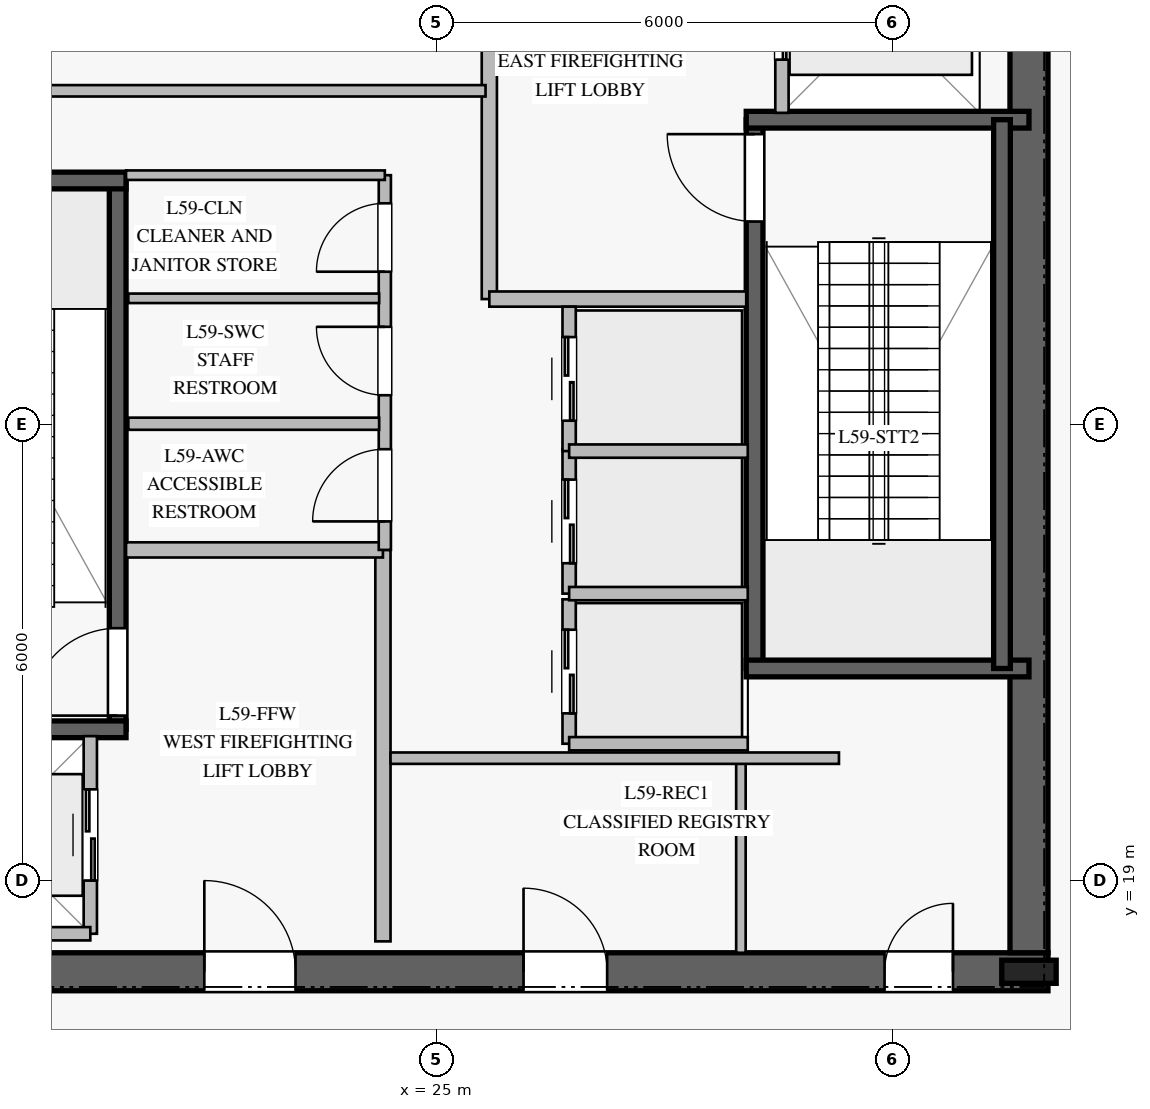
"""IFC4 building model, lengths in metres.
Left out: names, types, materials, properties, quantities, classifications, styles, units other than length and angle.
Written with IfcOpenShell. Run it as: python <this file> out.ifc"""

import sys

from ifc_helpers import new_model, si_unit, direction, frame, frame_2d, origin, origin_2d, place, context, subcontext, project, spatial, rectangle, i_section, extrude, element, fill, save


model = new_model("IFC4")
c1 = context("Model", 3, precision=1e-05, world=origin(), true_north=direction((0.0, 1.0)))
c2 = subcontext(c1, "Body", "Model", "MODEL_VIEW")
j1 = project(units=[si_unit("LENGTHUNIT", "METRE"), si_unit("PLANEANGLEUNIT", "RADIAN")], contexts=[c1])
p1 = place(None, origin())
s1 = spatial("IfcSite", under=j1, at=p1, CompositionType="ELEMENT")
p2 = place(p1, origin())
s2 = spatial("IfcBuilding", under=s1, at=p2, CompositionType="ELEMENT")
p3 = place(p2, frame((0.0, 0.0, 244.8)))
s3 = spatial("IfcBuildingStorey", under=s2, at=p3, CompositionType="ELEMENT", Elevation=244.8)
p4 = place(p3, frame((16.95, 17.8, 0.0), z_axis=(0.0, 0.0, 1.0), x_axis=(1.0, 0.0, 0.0)))
e1 = element("IfcWall", 1, at=p4, inside=s3, PredefinedType="SHEAR", context=c2, shape_type="SweptSolid", body=[
    extrude(rectangle(XDim=16.1, YDim=0.5, at=frame_2d((8.05, 0.0))), origin(), (0.0, 0.0, 1.0), 5.18),
])
p5 = place(p4, frame((5.0, 0.0, 0.0)))
e2 = element("IfcOpeningElement", 2, at=p5, cuts=e1, PredefinedType="OPENING", context=c2, shape_type="SweptSolid", body=[
    extrude(rectangle(XDim=1.2, YDim=2.25, at=frame_2d((0.6, 1.125))), frame((0.0, 0.26, 0.0), z_axis=(0.0, -1.0, 0.0), x_axis=(1.0, 0.0, 0.0)), (0.0, 0.0, 1.0), 0.52),
])
p6 = place(p4, frame((13.95, 0.0, 0.0)))
e3 = element("IfcOpeningElement", 3, at=p6, cuts=e1, PredefinedType="OPENING", context=c2, shape_type="SweptSolid", body=[
    extrude(rectangle(XDim=0.9, YDim=2.1, at=frame_2d((0.45, 1.05))), frame((0.0, 0.26, 0.0), z_axis=(0.0, -1.0, 0.0), x_axis=(1.0, 0.0, 0.0)), (0.0, 0.0, 1.0), 0.52),
])
p7 = place(p4, frame((9.2, 0.0, 0.0)))
e4 = element("IfcOpeningElement", 4, at=p7, cuts=e1, PredefinedType="OPENING", context=c2, shape_type="SweptSolid", body=[
    extrude(rectangle(XDim=1.1, YDim=2.2, at=frame_2d((0.55, 1.1))), frame((0.0, 0.26, 0.0), z_axis=(0.0, -1.0, 0.0), x_axis=(1.0, 0.0, 0.0)), (0.0, 0.0, 1.0), 0.52),
])
p8 = place(p3, frame((32.8, 18.05, 0.0), z_axis=(0.0, 0.0, 1.0), x_axis=(0.0, 1.0, 0.0)))
e5 = element("IfcWall", 5, at=p8, inside=s3, PredefinedType="SHEAR", context=c2, shape_type="SweptSolid", body=[
    extrude(rectangle(XDim=13.9, YDim=0.5, at=frame_2d((6.95, 0.0))), origin(), (0.0, 0.0, 1.0), 5.18),
])
p9 = place(p3, frame((32.8, 17.8, 0.0), z_axis=(0.0, 0.0, 1.0), x_axis=(1.0, 0.0, 0.0)))
e6 = element("IfcColumn", 6, at=p9, inside=s3, PredefinedType="COLUMN", context=c2, shape_type="SweptSolid", body=[
    extrude(i_section(OverallWidth=0.304, OverallDepth=0.716, WebThickness=0.021, FlangeThickness=0.04, at=origin_2d()), origin(), (0.0, 0.0, 1.0), 5.4),
])
p10 = place(p3, frame((20.81, 20.99, 0.0), z_axis=(0.0, 0.0, 1.0), x_axis=(0.0, 1.0, 0.0)))
e7 = element("IfcWall", 7, at=p10, inside=s3, PredefinedType="SOLIDWALL", context=c2, shape_type="SweptSolid", body=[
    extrude(rectangle(XDim=7.22, YDim=0.22, at=frame_2d((3.61, 0.0))), origin(), (0.0, 0.0, 1.0), 5.18),
])
p11 = place(p10, frame((0.18, 0.0, 0.0)))
e8 = element("IfcOpeningElement", 8, at=p11, cuts=e7, PredefinedType="OPENING", context=c2, shape_type="SweptSolid", body=[
    extrude(rectangle(XDim=1.15, YDim=2.2, at=frame_2d((0.575, 1.1))), frame((0.0, 0.12, 0.0), z_axis=(0.0, -1.0, 0.0), x_axis=(1.0, 0.0, 0.0)), (0.0, 0.0, 1.0), 0.24),
])
for number, where, z_axis, x_axis in (
    (9, (17.2, 20.99, 0.0), (0.0, 0.0, 1.0), (1.0, 0.0, 0.0)),
    (10, (17.2, 28.21, 0.0), (0.0, 0.0, 1.0), (1.0, 0.0, 0.0)),
):
    element("IfcWall", number, at=place(p3, frame(where, z_axis=z_axis, x_axis=x_axis)), inside=s3, PredefinedType="SOLIDWALL", context=c2, shape_type="SweptSolid", body=[
        extrude(rectangle(XDim=3.72, YDim=0.22, at=frame_2d((1.86, 0.0))), origin(), (0.0, 0.0, 1.0), 5.18),
    ])
p12 = place(p3, frame((29.19, 21.79, 0.0), z_axis=(0.0, 0.0, 1.0), x_axis=(0.0, 1.0, 0.0)))
e11 = element("IfcWall", 11, at=p12, inside=s3, PredefinedType="SOLIDWALL", context=c2, shape_type="SweptSolid", body=[
    extrude(rectangle(XDim=7.22, YDim=0.22, at=frame_2d((3.61, 0.0))), origin(), (0.0, 0.0, 1.0), 5.18),
])
p13 = place(p12, frame((5.88, 0.0, 0.0)))
e12 = element("IfcOpeningElement", 12, at=p13, cuts=e11, PredefinedType="OPENING", context=c2, shape_type="SweptSolid", body=[
    extrude(rectangle(XDim=1.15, YDim=2.2, at=frame_2d((0.575, 1.1))), frame((0.0, 0.12, 0.0), z_axis=(0.0, -1.0, 0.0), x_axis=(1.0, 0.0, 0.0)), (0.0, 0.0, 1.0), 0.24),
])
for number, where, z_axis, x_axis in (
    (13, (29.08, 21.79, 0.0), (0.0, 0.0, 1.0), (1.0, 0.0, 0.0)),
    (14, (29.08, 29.01, 0.0), (0.0, 0.0, 1.0), (1.0, 0.0, 0.0)),
):
    element("IfcWall", number, at=place(p3, frame(where, z_axis=z_axis, x_axis=x_axis)), inside=s3, PredefinedType="SOLIDWALL", context=c2, shape_type="SweptSolid", body=[
        extrude(rectangle(XDim=3.72, YDim=0.22, at=frame_2d((1.86, 0.0))), origin(), (0.0, 0.0, 1.0), 5.18),
    ])
p14 = place(p3, frame((32.445, 29.01, 0.0), z_axis=(0.0, 0.0, 1.0), x_axis=(0.0, -1.0, 0.0)))
e15 = element("IfcWall", 15, at=p14, inside=s3, PredefinedType="SOLIDWALL", context=c2, shape_type="SweptSolid", body=[
    extrude(rectangle(XDim=7.22, YDim=0.22, at=frame_2d((3.61, 0.0))), origin(), (0.0, 0.0, 1.0), 5.18),
])
p15 = place(p3, frame((24.3, 18.2, 0.0), z_axis=(0.0, 0.0, 1.0), x_axis=(0.0, 1.0, 0.0)))
e16 = element("IfcWall", 16, at=p15, inside=s3, PredefinedType="PARTITIONING", context=c2, shape_type="SweptSolid", body=[
    extrude(rectangle(XDim=5.15, YDim=0.2, at=frame_2d((2.575, 0.0))), origin(), (0.0, 0.0, 1.0), 5.18),
])
p16 = place(p3, frame((20.92, 23.35, 0.0), z_axis=(0.0, 0.0, 1.0), x_axis=(1.0, 0.0, 0.0)))
e17 = element("IfcWall", 17, at=p16, inside=s3, PredefinedType="PARTITIONING", context=c2, shape_type="SweptSolid", body=[
    extrude(rectangle(XDim=3.38, YDim=0.2, at=frame_2d((1.69, 0.0))), origin(), (0.0, 0.0, 1.0), 5.18),
])
p17 = place(p3, frame((25.7, 26.65, 0.0), z_axis=(0.0, 0.0, 1.0), x_axis=(0.0, 1.0, 0.0)))
e18 = element("IfcWall", 18, at=p17, inside=s3, PredefinedType="PARTITIONING", context=c2, shape_type="SweptSolid", body=[
    extrude(rectangle(XDim=5.15, YDim=0.2, at=frame_2d((2.575, 0.0))), origin(), (0.0, 0.0, 1.0), 5.18),
])
p18 = place(p3, frame((25.7, 26.65, 0.0), z_axis=(0.0, 0.0, 1.0), x_axis=(1.0, 0.0, 0.0)))
e19 = element("IfcWall", 19, at=p18, inside=s3, PredefinedType="PARTITIONING", context=c2, shape_type="SweptSolid", body=[
    extrude(rectangle(XDim=3.38, YDim=0.2, at=frame_2d((1.69, 0.0))), origin(), (0.0, 0.0, 1.0), 5.18),
])
p19 = place(p3, frame((24.325, 23.35, 0.0), z_axis=(0.0, 0.0, 1.0), x_axis=(0.0, 1.0, 0.0)))
e20 = element("IfcWall", 20, at=p19, inside=s3, PredefinedType="PLUMBINGWALL", context=c2, shape_type="SweptSolid", body=[
    extrude(rectangle(XDim=4.93, YDim=0.16, at=frame_2d((2.465, 0.0))), origin(), (0.0, 0.0, 1.0), 5.18),
])
p20 = place(p19, frame((0.375, 0.0, 0.0)))
e21 = element("IfcOpeningElement", 21, at=p20, cuts=e20, PredefinedType="OPENING", context=c2, shape_type="SweptSolid", body=[
    extrude(rectangle(XDim=0.95, YDim=2.1, at=frame_2d((0.475, 1.05))), frame((0.0, 0.09, 0.0), z_axis=(0.0, -1.0, 0.0), x_axis=(1.0, 0.0, 0.0)), (0.0, 0.0, 1.0), 0.18),
])
p21 = place(p19, frame((2.035, 0.0, 0.0)))
e22 = element("IfcOpeningElement", 22, at=p21, cuts=e20, PredefinedType="OPENING", context=c2, shape_type="SweptSolid", body=[
    extrude(rectangle(XDim=0.9, YDim=2.1, at=frame_2d((0.45, 1.05))), frame((0.0, 0.09, 0.0), z_axis=(0.0, -1.0, 0.0), x_axis=(1.0, 0.0, 0.0)), (0.0, 0.0, 1.0), 0.18),
])
p22 = place(p19, frame((3.66, 0.0, 0.0)))
e23 = element("IfcOpeningElement", 23, at=p22, cuts=e20, PredefinedType="OPENING", context=c2, shape_type="SweptSolid", body=[
    extrude(rectangle(XDim=0.9, YDim=2.1, at=frame_2d((0.45, 1.05))), frame((0.0, 0.09, 0.0), z_axis=(0.0, -1.0, 0.0), x_axis=(1.0, 0.0, 0.0)), (0.0, 0.0, 1.0), 0.18),
])
p23 = place(p3, frame((20.92, 28.28, 0.0), z_axis=(0.0, 0.0, 1.0), x_axis=(1.0, 0.0, 0.0)))
e24 = element("IfcWall", 24, at=p23, inside=s3, PredefinedType="PARTITIONING", context=c2, shape_type="SweptSolid", body=[
    extrude(rectangle(XDim=3.405, YDim=0.125, at=frame_2d((1.703, 0.0))), origin(), (0.0, 0.0, 1.0), 5.18),
])
p24 = place(p3, frame((29.01, 18.05, 0.0), z_axis=(0.0, 0.0, 1.0), x_axis=(0.0, 1.0, 0.0)))
e25 = element("IfcWall", 25, at=p24, inside=s3, PredefinedType="PARTITIONING", context=c2, shape_type="SweptSolid", body=[
    extrude(rectangle(XDim=2.5, YDim=0.125, at=frame_2d((1.25, 0.0))), origin(), (0.0, 0.0, 1.0), 5.18),
])
p25 = place(p3, frame((20.95, 25.01, 0.0), z_axis=(0.0, 0.0, 1.0), x_axis=(1.0, 0.0, 0.0)))
e26 = element("IfcWall", 26, at=p25, inside=s3, PredefinedType="PLUMBINGWALL", context=c2, shape_type="SweptSolid", body=[
    extrude(rectangle(XDim=3.3, YDim=0.16, at=frame_2d((1.65, 0.0))), origin(), (0.0, 0.0, 1.0), 5.18),
])
p26 = place(p3, frame((20.95, 26.66, 0.0), z_axis=(0.0, 0.0, 1.0), x_axis=(1.0, 0.0, 0.0)))
e27 = element("IfcWall", 27, at=p26, inside=s3, PredefinedType="PARTITIONING", context=c2, shape_type="SweptSolid", body=[
    extrude(rectangle(XDim=3.3, YDim=0.125, at=frame_2d((1.65, 0.0))), origin(), (0.0, 0.0, 1.0), 5.18),
])
p27 = place(p3, frame((24.4, 20.61, 0.0), z_axis=(0.0, 0.0, 1.0), x_axis=(1.0, 0.0, 0.0)))
e28 = element("IfcWall", 28, at=p27, inside=s3, PredefinedType="PARTITIONING", context=c2, shape_type="SweptSolid", body=[
    extrude(rectangle(XDim=5.9, YDim=0.15, at=frame_2d((2.95, 0.0))), origin(), (0.0, 0.0, 1.0), 5.18),
])
p28 = place(p3, frame((19.75, 29.39, 0.0), z_axis=(0.0, 0.0, 1.0), x_axis=(1.0, 0.0, 0.0)))
e29 = element("IfcWall", 29, at=p28, inside=s3, PredefinedType="PARTITIONING", context=c2, shape_type="SweptSolid", body=[
    extrude(rectangle(XDim=5.9, YDim=0.15, at=frame_2d((2.95, 0.0))), origin(), (0.0, 0.0, 1.0), 5.18),
])
p29 = place(p3, frame((26.75, 20.8, 0.0), z_axis=(0.0, 0.0, 1.0), x_axis=(0.0, 1.0, 0.0)))
e30 = element("IfcWall", 30, at=p29, inside=s3, PredefinedType="PARTITIONING", context=c2, shape_type="SweptSolid", body=[
    extrude(rectangle(XDim=1.9, YDim=0.175, at=frame_2d((0.95, 0.0))), origin(), (0.0, 0.0, 1.0), 5.18),
])
p30 = place(p29, frame((0.4, 0.0, 0.0)))
e31 = element("IfcOpeningElement", 31, at=p30, cuts=e30, PredefinedType="OPENING", context=c2, shape_type="SweptSolid", body=[
    extrude(rectangle(XDim=1.1, YDim=2.2, at=frame_2d((0.55, 1.1))), frame((0.0, 0.098, 0.0), z_axis=(0.0, -1.0, 0.0), x_axis=(1.0, 0.0, 0.0)), (0.0, 0.0, 1.0), 0.195),
])
p31 = place(p3, frame((26.75, 20.8, 0.0), z_axis=(0.0, 0.0, 1.0), x_axis=(1.0, 0.0, 0.0)))
e32 = element("IfcWall", 32, at=p31, inside=s3, PredefinedType="PARTITIONING", context=c2, shape_type="SweptSolid", body=[
    extrude(rectangle(XDim=2.35, YDim=0.175, at=frame_2d((1.175, 0.0))), origin(), (0.0, 0.0, 1.0), 5.18),
])
p32 = place(p3, frame((26.75, 22.775, 0.0), z_axis=(0.0, 0.0, 1.0), x_axis=(0.0, 1.0, 0.0)))
e33 = element("IfcWall", 33, at=p32, inside=s3, PredefinedType="PARTITIONING", context=c2, shape_type="SweptSolid", body=[
    extrude(rectangle(XDim=1.9, YDim=0.175, at=frame_2d((0.95, 0.0))), origin(), (0.0, 0.0, 1.0), 5.18),
])
p33 = place(p32, frame((0.4, 0.0, 0.0)))
e34 = element("IfcOpeningElement", 34, at=p33, cuts=e33, PredefinedType="OPENING", context=c2, shape_type="SweptSolid", body=[
    extrude(rectangle(XDim=1.1, YDim=2.2, at=frame_2d((0.55, 1.1))), frame((0.0, 0.098, 0.0), z_axis=(0.0, -1.0, 0.0), x_axis=(1.0, 0.0, 0.0)), (0.0, 0.0, 1.0), 0.195),
])
p34 = place(p3, frame((26.75, 22.775, 0.0), z_axis=(0.0, 0.0, 1.0), x_axis=(1.0, 0.0, 0.0)))
e35 = element("IfcWall", 35, at=p34, inside=s3, PredefinedType="PARTITIONING", context=c2, shape_type="SweptSolid", body=[
    extrude(rectangle(XDim=2.35, YDim=0.175, at=frame_2d((1.175, 0.0))), origin(), (0.0, 0.0, 1.0), 5.18),
])
p35 = place(p3, frame((26.75, 24.65, 0.0), z_axis=(0.0, 0.0, 1.0), x_axis=(0.0, 1.0, 0.0)))
e36 = element("IfcWall", 36, at=p35, inside=s3, PredefinedType="PARTITIONING", context=c2, shape_type="SweptSolid", body=[
    extrude(rectangle(XDim=1.9, YDim=0.175, at=frame_2d((0.95, 0.0))), origin(), (0.0, 0.0, 1.0), 5.18),
])
p36 = place(p35, frame((0.4, 0.0, 0.0)))
e37 = element("IfcOpeningElement", 37, at=p36, cuts=e36, PredefinedType="OPENING", context=c2, shape_type="SweptSolid", body=[
    extrude(rectangle(XDim=1.1, YDim=2.2, at=frame_2d((0.55, 1.1))), frame((0.0, 0.098, 0.0), z_axis=(0.0, -1.0, 0.0), x_axis=(1.0, 0.0, 0.0)), (0.0, 0.0, 1.0), 0.195),
])
p37 = place(p3, frame((26.75, 24.65, 0.0), z_axis=(0.0, 0.0, 1.0), x_axis=(1.0, 0.0, 0.0)))
e38 = element("IfcWall", 38, at=p37, inside=s3, PredefinedType="PARTITIONING", context=c2, shape_type="SweptSolid", body=[
    extrude(rectangle(XDim=2.35, YDim=0.175, at=frame_2d((1.175, 0.0))), origin(), (0.0, 0.0, 1.0), 5.18),
])
p38 = place(p3, frame((20.45, 18.3, 0.0), z_axis=(0.0, 0.0, 1.0), x_axis=(0.0, 1.0, 0.0)))
e39 = element("IfcWall", 39, at=p38, inside=s3, PredefinedType="PARTITIONING", context=c2, shape_type="SweptSolid", body=[
    extrude(rectangle(XDim=2.6, YDim=0.175, at=frame_2d((1.3, 0.0))), origin(), (0.0, 0.0, 1.0), 5.18),
])
p39 = place(p38, frame((0.7, 0.0, 0.0)))
e40 = element("IfcOpeningElement", 40, at=p39, cuts=e39, PredefinedType="OPENING", context=c2, shape_type="SweptSolid", body=[
    extrude(rectangle(XDim=1.2, YDim=2.2, at=frame_2d((0.6, 1.1))), frame((0.0, 0.098, 0.0), z_axis=(0.0, -1.0, 0.0), x_axis=(1.0, 0.0, 0.0)), (0.0, 0.0, 1.0), 0.195),
])
p40 = place(p3, frame((17.85, 18.3, 0.0), z_axis=(0.0, 0.0, 1.0), x_axis=(1.0, 0.0, 0.0)))
e41 = element("IfcWall", 41, at=p40, inside=s3, PredefinedType="PARTITIONING", context=c2, shape_type="SweptSolid", body=[
    extrude(rectangle(XDim=2.6, YDim=0.175, at=frame_2d((1.3, 0.0))), origin(), (0.0, 0.0, 1.0), 5.18),
])
p41 = place(p3, frame((29.55, 29.1, 0.0), z_axis=(0.0, 0.0, 1.0), x_axis=(0.0, 1.0, 0.0)))
e42 = element("IfcWall", 42, at=p41, inside=s3, PredefinedType="PARTITIONING", context=c2, shape_type="SweptSolid", body=[
    extrude(rectangle(XDim=2.6, YDim=0.175, at=frame_2d((1.3, 0.0))), origin(), (0.0, 0.0, 1.0), 5.18),
])
p42 = place(p41, frame((0.7, 0.0, 0.0)))
e43 = element("IfcOpeningElement", 43, at=p42, cuts=e42, PredefinedType="OPENING", context=c2, shape_type="SweptSolid", body=[
    extrude(rectangle(XDim=1.2, YDim=2.2, at=frame_2d((0.6, 1.1))), frame((0.0, 0.098, 0.0), z_axis=(0.0, -1.0, 0.0), x_axis=(1.0, 0.0, 0.0)), (0.0, 0.0, 1.0), 0.195),
])
p43 = place(p11, origin())
e44 = element("IfcDoor", 44, at=p43, inside=s3, OperationType="SINGLE_SWING_LEFT", PredefinedType="DOOR", context=c2, shape_type="SweptSolid", body=[
    extrude(rectangle(XDim=1.15, YDim=2.2, at=frame_2d((0.575, 1.1))), frame((0.0, 0.025, 0.0), z_axis=(0.0, -1.0, 0.0), x_axis=(1.0, 0.0, 0.0)), (0.0, 0.0, 1.0), 0.05),
])
fill(e8, e44)
p44 = place(p13, origin())
e45 = element("IfcDoor", 45, at=p44, inside=s3, OperationType="SINGLE_SWING_RIGHT", PredefinedType="DOOR", context=c2, shape_type="SweptSolid", body=[
    extrude(rectangle(XDim=1.15, YDim=2.2, at=frame_2d((0.575, 1.1))), frame((0.0, 0.025, 0.0), z_axis=(0.0, -1.0, 0.0), x_axis=(1.0, 0.0, 0.0)), (0.0, 0.0, 1.0), 0.05),
])
fill(e12, e45)
p45 = place(p5, origin())
e46 = element("IfcDoor", 46, at=p45, inside=s3, OperationType="SINGLE_SWING_LEFT", PredefinedType="DOOR", context=c2, shape_type="SweptSolid", body=[
    extrude(rectangle(XDim=1.2, YDim=2.25, at=frame_2d((0.6, 1.125))), frame((0.0, 0.025, 0.0), z_axis=(0.0, -1.0, 0.0), x_axis=(1.0, 0.0, 0.0)), (0.0, 0.0, 1.0), 0.05),
])
fill(e2, e46)
p46 = place(p20, origin())
e47 = element("IfcDoor", 47, at=p46, inside=s3, OperationType="SINGLE_SWING_LEFT", PredefinedType="DOOR", context=c2, shape_type="SweptSolid", body=[
    extrude(rectangle(XDim=0.95, YDim=2.1, at=frame_2d((0.475, 1.05))), frame((0.0, 0.025, 0.0), z_axis=(0.0, -1.0, 0.0), x_axis=(1.0, 0.0, 0.0)), (0.0, 0.0, 1.0), 0.05),
])
fill(e21, e47)
p47 = place(p21, origin())
e48 = element("IfcDoor", 48, at=p47, inside=s3, OperationType="SINGLE_SWING_RIGHT", PredefinedType="DOOR", context=c2, shape_type="SweptSolid", body=[
    extrude(rectangle(XDim=0.9, YDim=2.1, at=frame_2d((0.45, 1.05))), frame((0.0, 0.025, 0.0), z_axis=(0.0, -1.0, 0.0), x_axis=(1.0, 0.0, 0.0)), (0.0, 0.0, 1.0), 0.05),
])
fill(e22, e48)
p48 = place(p22, origin())
e49 = element("IfcDoor", 49, at=p48, inside=s3, OperationType="SINGLE_SWING_LEFT", PredefinedType="DOOR", context=c2, shape_type="SweptSolid", body=[
    extrude(rectangle(XDim=0.9, YDim=2.1, at=frame_2d((0.45, 1.05))), frame((0.0, 0.025, 0.0), z_axis=(0.0, -1.0, 0.0), x_axis=(1.0, 0.0, 0.0)), (0.0, 0.0, 1.0), 0.05),
])
fill(e23, e49)
p49 = place(p6, origin())
e50 = element("IfcDoor", 50, at=p49, inside=s3, OperationType="SINGLE_SWING_RIGHT", PredefinedType="DOOR", context=c2, shape_type="SweptSolid", body=[
    extrude(rectangle(XDim=0.9, YDim=2.1, at=frame_2d((0.45, 1.05))), frame((0.0, 0.025, 0.0), z_axis=(0.0, -1.0, 0.0), x_axis=(1.0, 0.0, 0.0)), (0.0, 0.0, 1.0), 0.05),
])
fill(e3, e50)
p50 = place(p7, origin())
e51 = element("IfcDoor", 51, at=p50, inside=s3, OperationType="SINGLE_SWING_LEFT", PredefinedType="DOOR", context=c2, shape_type="SweptSolid", body=[
    extrude(rectangle(XDim=1.1, YDim=2.2, at=frame_2d((0.55, 1.1))), frame((0.0, 0.025, 0.0), z_axis=(0.0, -1.0, 0.0), x_axis=(1.0, 0.0, 0.0)), (0.0, 0.0, 1.0), 0.05),
])
fill(e4, e51)
p51 = place(p30, origin())
e52 = element("IfcDoor", 52, at=p51, inside=s3, OperationType="DOUBLE_DOOR_SLIDING", PredefinedType="DOOR", context=c2, shape_type="SweptSolid", body=[
    extrude(rectangle(XDim=1.1, YDim=2.2, at=frame_2d((0.55, 1.1))), frame((0.0, 0.025, 0.0), z_axis=(0.0, -1.0, 0.0), x_axis=(1.0, 0.0, 0.0)), (0.0, 0.0, 1.0), 0.05),
])
fill(e31, e52)
p52 = place(p33, origin())
e53 = element("IfcDoor", 53, at=p52, inside=s3, OperationType="DOUBLE_DOOR_SLIDING", PredefinedType="DOOR", context=c2, shape_type="SweptSolid", body=[
    extrude(rectangle(XDim=1.1, YDim=2.2, at=frame_2d((0.55, 1.1))), frame((0.0, 0.025, 0.0), z_axis=(0.0, -1.0, 0.0), x_axis=(1.0, 0.0, 0.0)), (0.0, 0.0, 1.0), 0.05),
])
fill(e34, e53)
p53 = place(p36, origin())
e54 = element("IfcDoor", 54, at=p53, inside=s3, OperationType="DOUBLE_DOOR_SLIDING", PredefinedType="DOOR", context=c2, shape_type="SweptSolid", body=[
    extrude(rectangle(XDim=1.1, YDim=2.2, at=frame_2d((0.55, 1.1))), frame((0.0, 0.025, 0.0), z_axis=(0.0, -1.0, 0.0), x_axis=(1.0, 0.0, 0.0)), (0.0, 0.0, 1.0), 0.05),
])
fill(e37, e54)
p54 = place(p39, origin())
e55 = element("IfcDoor", 55, at=p54, inside=s3, OperationType="DOUBLE_DOOR_SLIDING", PredefinedType="DOOR", context=c2, shape_type="SweptSolid", body=[
    extrude(rectangle(XDim=1.2, YDim=2.2, at=frame_2d((0.6, 1.1))), frame((0.0, 0.025, 0.0), z_axis=(0.0, -1.0, 0.0), x_axis=(1.0, 0.0, 0.0)), (0.0, 0.0, 1.0), 0.05),
])
fill(e40, e55)
p55 = place(p42, origin())
e56 = element("IfcDoor", 56, at=p55, inside=s3, OperationType="DOUBLE_DOOR_SLIDING", PredefinedType="DOOR", context=c2, shape_type="SweptSolid", body=[
    extrude(rectangle(XDim=1.2, YDim=2.2, at=frame_2d((0.6, 1.1))), frame((0.0, 0.025, 0.0), z_axis=(0.0, -1.0, 0.0), x_axis=(1.0, 0.0, 0.0)), (0.0, 0.0, 1.0), 0.05),
])
fill(e43, e56)
save(model, sys.argv[1])
